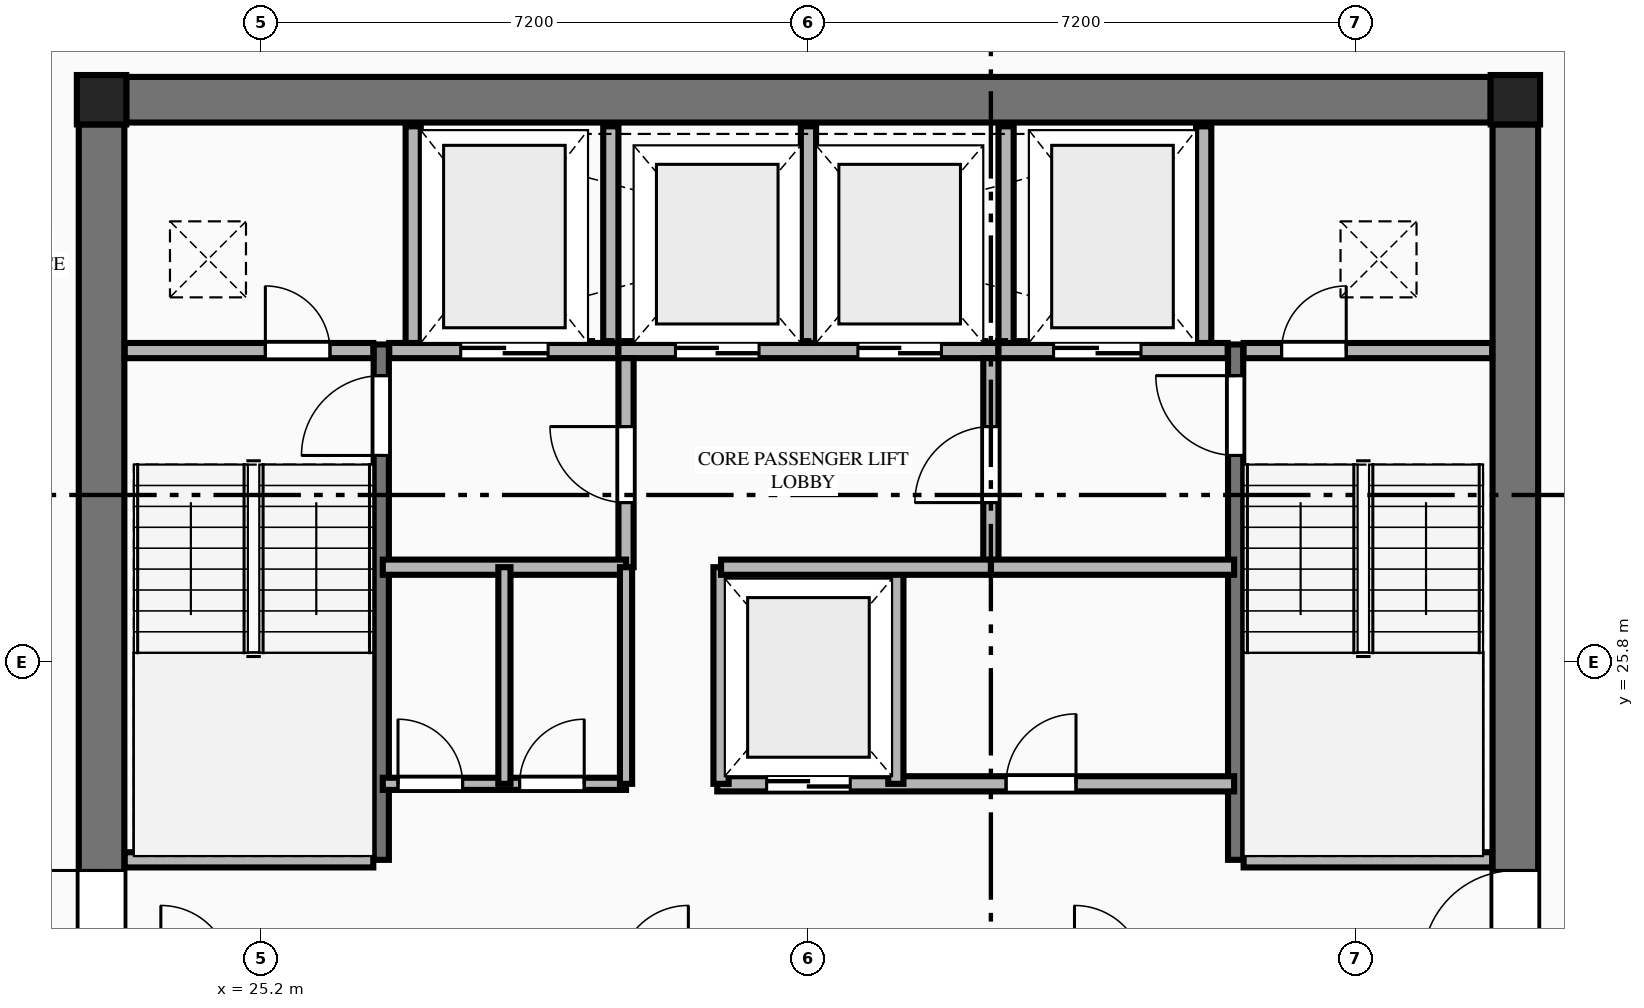
"""IFC4 building model, lengths in metres.
Left out: names, types, materials, properties, quantities, classifications, styles, units other than length and angle.
Written with IfcOpenShell. Run it as: python <this file> out.ifc"""

import sys

from ifc_helpers import new_model, si_unit, direction, frame, frame_2d, origin, origin_2d, place, context, subcontext, project, spatial, rectangle, extrude, element, fill, save


model = new_model("IFC4")
c1 = context("Model", 3, precision=1e-05, world=origin(), true_north=direction((0.0, 1.0)))
c2 = subcontext(c1, "Body", "Model", "MODEL_VIEW")
j1 = project(units=[si_unit("LENGTHUNIT", "METRE"), si_unit("PLANEANGLEUNIT", "RADIAN")], contexts=[c1])
p1 = place(None, origin())
s1 = spatial("IfcSite", under=j1, at=p1, CompositionType="ELEMENT")
p2 = place(p1, origin())
s2 = spatial("IfcBuilding", under=s1, at=p2, CompositionType="ELEMENT")
p3 = place(p2, frame((0.0, 0.0, 218.05)))
s3 = spatial("IfcBuildingStorey", under=s2, at=p3, CompositionType="ELEMENT", Elevation=218.05)
for number, where, z_axis, x_axis in (
    (1, (41.7, 33.2, 0.0), (0.0, 0.0, 1.0), (1.0, 0.0, 0.0)),
    (2, (23.1, 33.2, 0.0), (0.0, 0.0, 1.0), (1.0, 0.0, 0.0)),
):
    element("IfcColumn", number, at=place(p3, frame(where, z_axis=z_axis, x_axis=x_axis)), inside=s3, PredefinedType="COLUMN", context=c2, shape_type="SweptSolid", body=[
        extrude(rectangle(XDim=0.65, YDim=0.65, at=origin_2d()), origin(), (0.0, 0.0, 1.0), 3.55),
    ])
p4 = place(p3, frame((23.425, 33.2, 0.0), z_axis=(0.0, 0.0, 1.0), x_axis=(1.0, 0.0, 0.0)))
e3 = element("IfcWall", 3, at=p4, inside=s3, PredefinedType="SHEAR", context=c2, shape_type="SweptSolid", body=[
    extrude(rectangle(XDim=17.95, YDim=0.6, at=frame_2d((8.975, 0.0))), origin(), (0.0, 0.0, 1.0), 3.27),
])
p5 = place(p3, frame((23.1, 18.925, 0.0), z_axis=(0.0, 0.0, 1.0), x_axis=(0.0, 1.0, 0.0)))
e4 = element("IfcWall", 4, at=p5, inside=s3, PredefinedType="SHEAR", context=c2, shape_type="SweptSolid", body=[
    extrude(rectangle(XDim=13.95, YDim=0.6, at=frame_2d((6.975, 0.0))), origin(), (0.0, 0.0, 1.0), 3.27),
])
p6 = place(p5, frame((2.915, 0.0, 0.0)))
e5 = element("IfcOpeningElement", 5, at=p6, cuts=e4, PredefinedType="OPENING", context=c2, shape_type="SweptSolid", body=[
    extrude(rectangle(XDim=1.22, YDim=2.25, at=frame_2d((0.61, 1.125))), frame((0.0, 0.31, 0.0), z_axis=(0.0, -1.0, 0.0), x_axis=(1.0, 0.0, 0.0)), (0.0, 0.0, 1.0), 0.62),
])
p7 = place(p3, frame((41.7, 18.925, 0.0), z_axis=(0.0, 0.0, 1.0), x_axis=(0.0, 1.0, 0.0)))
e6 = element("IfcWall", 6, at=p7, inside=s3, PredefinedType="SHEAR", context=c2, shape_type="SweptSolid", body=[
    extrude(rectangle(XDim=13.95, YDim=0.6, at=frame_2d((6.975, 0.0))), origin(), (0.0, 0.0, 1.0), 3.27),
])
p8 = place(p7, frame((2.915, 0.0, 0.0)))
e7 = element("IfcOpeningElement", 7, at=p8, cuts=e6, PredefinedType="OPENING", context=c2, shape_type="SweptSolid", body=[
    extrude(rectangle(XDim=1.22, YDim=2.25, at=frame_2d((0.61, 1.125))), frame((0.0, 0.31, 0.0), z_axis=(0.0, -1.0, 0.0), x_axis=(1.0, 0.0, 0.0)), (0.0, 0.0, 1.0), 0.62),
])
p9 = place(p3, frame((26.78, 23.2, 0.0), z_axis=(0.0, 0.0, 1.0), x_axis=(0.0, 1.0, 0.0)))
e8 = element("IfcWall", 8, at=p9, inside=s3, PredefinedType="SHEAR", context=c2, shape_type="SweptSolid", body=[
    extrude(rectangle(XDim=6.78, YDim=0.2, at=frame_2d((3.39, 0.0))), origin(), (0.0, 0.0, 1.0), 3.55),
])
p10 = place(p9, frame((5.32, 0.0, 0.0)))
e9 = element("IfcOpeningElement", 9, at=p10, cuts=e8, PredefinedType="OPENING", context=c2, shape_type="SweptSolid", body=[
    extrude(rectangle(XDim=1.05, YDim=2.15, at=frame_2d((0.525, 1.075))), frame((0.0, 0.11, 0.0), z_axis=(0.0, -1.0, 0.0), x_axis=(1.0, 0.0, 0.0)), (0.0, 0.0, 1.0), 0.22),
])
p11 = place(p3, frame((23.405, 23.2, 0.0), z_axis=(0.0, 0.0, 1.0), x_axis=(1.0, 0.0, 0.0)))
e10 = element("IfcWall", 10, at=p11, inside=s3, PredefinedType="PLUMBINGWALL", context=c2, shape_type="SweptSolid", body=[
    extrude(rectangle(XDim=3.27, YDim=0.2, at=frame_2d((1.635, 0.0))), origin(), (0.0, 0.0, 1.0), 3.27),
])
p12 = place(p3, frame((38.02, 23.2, 0.0), z_axis=(0.0, 0.0, 1.0), x_axis=(0.0, 1.0, 0.0)))
e11 = element("IfcWall", 11, at=p12, inside=s3, PredefinedType="SHEAR", context=c2, shape_type="SweptSolid", body=[
    extrude(rectangle(XDim=6.78, YDim=0.2, at=frame_2d((3.39, 0.0))), origin(), (0.0, 0.0, 1.0), 3.55),
])
p13 = place(p12, frame((5.32, 0.0, 0.0)))
e12 = element("IfcOpeningElement", 12, at=p13, cuts=e11, PredefinedType="OPENING", context=c2, shape_type="SweptSolid", body=[
    extrude(rectangle(XDim=1.05, YDim=2.15, at=frame_2d((0.525, 1.075))), frame((0.0, 0.11, 0.0), z_axis=(0.0, -1.0, 0.0), x_axis=(1.0, 0.0, 0.0)), (0.0, 0.0, 1.0), 0.22),
])
p14 = place(p3, frame((38.125, 23.2, 0.0), z_axis=(0.0, 0.0, 1.0), x_axis=(1.0, 0.0, 0.0)))
e13 = element("IfcWall", 13, at=p14, inside=s3, PredefinedType="PLUMBINGWALL", context=c2, shape_type="SweptSolid", body=[
    extrude(rectangle(XDim=3.27, YDim=0.2, at=frame_2d((1.635, 0.0))), origin(), (0.0, 0.0, 1.0), 3.27),
])
p15 = place(p3, frame((23.405, 29.9, 0.0), z_axis=(0.0, 0.0, 1.0), x_axis=(1.0, 0.0, 0.0)))
e14 = element("IfcWall", 14, at=p15, inside=s3, PredefinedType="PLUMBINGWALL", context=c2, shape_type="SweptSolid", body=[
    extrude(rectangle(XDim=3.27, YDim=0.2, at=frame_2d((1.635, 0.0))), origin(), (0.0, 0.0, 1.0), 3.27),
])
p16 = place(p15, frame((1.85, 0.0, 0.0)))
e15 = element("IfcOpeningElement", 15, at=p16, cuts=e14, PredefinedType="OPENING", context=c2, shape_type="SweptSolid", body=[
    extrude(rectangle(XDim=0.85, YDim=2.05, at=frame_2d((0.425, 1.025))), frame((0.0, 0.11, 0.0), z_axis=(0.0, -1.0, 0.0), x_axis=(1.0, 0.0, 0.0)), (0.0, 0.0, 1.0), 0.22),
])
p17 = place(p3, frame((26.885, 29.9, 0.0), z_axis=(0.0, 0.0, 1.0), x_axis=(1.0, 0.0, 0.0)))
e16 = element("IfcWall", 16, at=p17, inside=s3, PredefinedType="PLUMBINGWALL", context=c2, shape_type="SweptSolid", body=[
    extrude(rectangle(XDim=3.015, YDim=0.2, at=frame_2d((1.507, 0.0))), origin(), (0.0, 0.0, 1.0), 3.27),
])
p18 = place(p17, frame((0.94, 0.0, 0.0)))
e17 = element("IfcOpeningElement", 17, at=p18, cuts=e16, PredefinedType="OPENING", context=c2, shape_type="SweptSolid", body=[
    extrude(rectangle(XDim=1.15, YDim=2.2, at=frame_2d((0.575, 1.1))), frame((0.0, 0.11, 0.0), z_axis=(0.0, -1.0, 0.0), x_axis=(1.0, 0.0, 0.0)), (0.0, 0.0, 1.0), 0.22),
])
p19 = place(p3, frame((29.9, 29.9, 0.0), z_axis=(0.0, 0.0, 1.0), x_axis=(1.0, 0.0, 0.0)))
e18 = element("IfcWall", 18, at=p19, inside=s3, PredefinedType="PLUMBINGWALL", context=c2, shape_type="SweptSolid", body=[
    extrude(rectangle(XDim=5.0, YDim=0.2, at=frame_2d((2.5, 0.0))), origin(), (0.0, 0.0, 1.0), 3.27),
])
p20 = place(p19, frame((0.75, 0.0, 0.0)))
e19 = element("IfcOpeningElement", 19, at=p20, cuts=e18, PredefinedType="OPENING", context=c2, shape_type="SweptSolid", body=[
    extrude(rectangle(XDim=1.1, YDim=2.2, at=frame_2d((0.55, 1.1))), frame((0.0, 0.11, 0.0), z_axis=(0.0, -1.0, 0.0), x_axis=(1.0, 0.0, 0.0)), (0.0, 0.0, 1.0), 0.22),
])
p21 = place(p19, frame((3.15, 0.0, 0.0)))
e20 = element("IfcOpeningElement", 20, at=p21, cuts=e18, PredefinedType="OPENING", context=c2, shape_type="SweptSolid", body=[
    extrude(rectangle(XDim=1.1, YDim=2.2, at=frame_2d((0.55, 1.1))), frame((0.0, 0.11, 0.0), z_axis=(0.0, -1.0, 0.0), x_axis=(1.0, 0.0, 0.0)), (0.0, 0.0, 1.0), 0.22),
])
p22 = place(p3, frame((34.9, 29.9, 0.0), z_axis=(0.0, 0.0, 1.0), x_axis=(1.0, 0.0, 0.0)))
e21 = element("IfcWall", 21, at=p22, inside=s3, PredefinedType="PLUMBINGWALL", context=c2, shape_type="SweptSolid", body=[
    extrude(rectangle(XDim=3.015, YDim=0.2, at=frame_2d((1.508, 0.0))), origin(), (0.0, 0.0, 1.0), 3.27),
])
p23 = place(p22, frame((0.725, 0.0, 0.0)))
e22 = element("IfcOpeningElement", 22, at=p23, cuts=e21, PredefinedType="OPENING", context=c2, shape_type="SweptSolid", body=[
    extrude(rectangle(XDim=1.15, YDim=2.2, at=frame_2d((0.575, 1.1))), frame((0.0, 0.11, 0.0), z_axis=(0.0, -1.0, 0.0), x_axis=(1.0, 0.0, 0.0)), (0.0, 0.0, 1.0), 0.22),
])
p24 = place(p3, frame((38.125, 29.9, 0.0), z_axis=(0.0, 0.0, 1.0), x_axis=(1.0, 0.0, 0.0)))
e23 = element("IfcWall", 23, at=p24, inside=s3, PredefinedType="PLUMBINGWALL", context=c2, shape_type="SweptSolid", body=[
    extrude(rectangle(XDim=3.27, YDim=0.2, at=frame_2d((1.635, 0.0))), origin(), (0.0, 0.0, 1.0), 3.27),
])
p25 = place(p24, frame((0.5, 0.0, 0.0)))
e24 = element("IfcOpeningElement", 24, at=p25, cuts=e23, PredefinedType="OPENING", context=c2, shape_type="SweptSolid", body=[
    extrude(rectangle(XDim=0.85, YDim=2.05, at=frame_2d((0.425, 1.025))), frame((0.0, 0.11, 0.0), z_axis=(0.0, -1.0, 0.0), x_axis=(1.0, 0.0, 0.0)), (0.0, 0.0, 1.0), 0.22),
])
for number, where, z_axis, x_axis in (
    (25, (27.2, 30.0, 0.0), (0.0, 0.0, 1.0), (0.0, 1.0, 0.0)),
    (26, (29.8, 30.0, 0.0), (0.0, 0.0, 1.0), (0.0, 1.0, 0.0)),
    (27, (32.4, 30.0, 0.0), (0.0, 0.0, 1.0), (0.0, 1.0, 0.0)),
    (28, (35.0, 30.0, 0.0), (0.0, 0.0, 1.0), (0.0, 1.0, 0.0)),
    (29, (37.6, 30.0, 0.0), (0.0, 0.0, 1.0), (0.0, 1.0, 0.0)),
):
    element("IfcWall", number, at=place(p3, frame(where, z_axis=z_axis, x_axis=x_axis)), inside=s3, PredefinedType="PLUMBINGWALL", context=c2, shape_type="SweptSolid", body=[
        extrude(rectangle(XDim=2.85, YDim=0.2, at=frame_2d((1.425, 0.0))), origin(), (0.0, 0.0, 1.0), 3.27),
    ])
p26 = place(p3, frame((30.0, 27.05, 0.0), z_axis=(0.0, 0.0, 1.0), x_axis=(0.0, 1.0, 0.0)))
e30 = element("IfcWall", 30, at=p26, inside=s3, PredefinedType="PLUMBINGWALL", context=c2, shape_type="SweptSolid", body=[
    extrude(rectangle(XDim=2.75, YDim=0.2, at=frame_2d((1.375, 0.0))), origin(), (0.0, 0.0, 1.0), 3.27),
])
p27 = place(p26, frame((0.85, 0.0, 0.0)))
e31 = element("IfcOpeningElement", 31, at=p27, cuts=e30, PredefinedType="OPENING", context=c2, shape_type="SweptSolid", body=[
    extrude(rectangle(XDim=1.0, YDim=2.15, at=frame_2d((0.5, 1.075))), frame((0.0, 0.11, 0.0), z_axis=(0.0, -1.0, 0.0), x_axis=(1.0, 0.0, 0.0)), (0.0, 0.0, 1.0), 0.22),
])
p28 = place(p3, frame((26.8, 27.05, 0.0), z_axis=(0.0, 0.0, 1.0), x_axis=(1.0, 0.0, 0.0)))
e32 = element("IfcWall", 32, at=p28, inside=s3, PredefinedType="PLUMBINGWALL", context=c2, shape_type="SweptSolid", body=[
    extrude(rectangle(XDim=3.2, YDim=0.2, at=frame_2d((1.6, 0.0))), origin(), (0.0, 0.0, 1.0), 3.27),
])
p29 = place(p3, frame((34.8, 27.05, 0.0), z_axis=(0.0, 0.0, 1.0), x_axis=(0.0, 1.0, 0.0)))
e33 = element("IfcWall", 33, at=p29, inside=s3, PredefinedType="PLUMBINGWALL", context=c2, shape_type="SweptSolid", body=[
    extrude(rectangle(XDim=2.75, YDim=0.2, at=frame_2d((1.375, 0.0))), origin(), (0.0, 0.0, 1.0), 3.27),
])
p30 = place(p29, frame((0.85, 0.0, 0.0)))
e34 = element("IfcOpeningElement", 34, at=p30, cuts=e33, PredefinedType="OPENING", context=c2, shape_type="SweptSolid", body=[
    extrude(rectangle(XDim=1.0, YDim=2.15, at=frame_2d((0.5, 1.075))), frame((0.0, 0.11, 0.0), z_axis=(0.0, -1.0, 0.0), x_axis=(1.0, 0.0, 0.0)), (0.0, 0.0, 1.0), 0.22),
])
p31 = place(p3, frame((34.8, 27.05, 0.0), z_axis=(0.0, 0.0, 1.0), x_axis=(1.0, 0.0, 0.0)))
e35 = element("IfcWall", 35, at=p31, inside=s3, PredefinedType="PLUMBINGWALL", context=c2, shape_type="SweptSolid", body=[
    extrude(rectangle(XDim=3.2, YDim=0.2, at=frame_2d((1.6, 0.0))), origin(), (0.0, 0.0, 1.0), 3.27),
])
p32 = place(p3, frame((26.8, 24.2, 0.0), z_axis=(0.0, 0.0, 1.0), x_axis=(1.0, 0.0, 0.0)))
e36 = element("IfcWall", 36, at=p32, inside=s3, PredefinedType="PARTITIONING", context=c2, shape_type="SweptSolid", body=[
    extrude(rectangle(XDim=3.2, YDim=0.16, at=frame_2d((1.6, 0.0))), origin(), (0.0, 0.0, 1.0), 3.27),
])
p33 = place(p32, frame((0.2, 0.0, 0.0)))
e37 = element("IfcOpeningElement", 37, at=p33, cuts=e36, PredefinedType="OPENING", context=c2, shape_type="SweptSolid", body=[
    extrude(rectangle(XDim=0.85, YDim=2.05, at=frame_2d((0.425, 1.025))), frame((0.0, 0.09, 0.0), z_axis=(0.0, -1.0, 0.0), x_axis=(1.0, 0.0, 0.0)), (0.0, 0.0, 1.0), 0.18),
])
p34 = place(p32, frame((1.8, 0.0, 0.0)))
e38 = element("IfcOpeningElement", 38, at=p34, cuts=e36, PredefinedType="OPENING", context=c2, shape_type="SweptSolid", body=[
    extrude(rectangle(XDim=0.85, YDim=2.05, at=frame_2d((0.425, 1.025))), frame((0.0, 0.09, 0.0), z_axis=(0.0, -1.0, 0.0), x_axis=(1.0, 0.0, 0.0)), (0.0, 0.0, 1.0), 0.18),
])
p35 = place(p3, frame((30.0, 24.2, 0.0), z_axis=(0.0, 0.0, 1.0), x_axis=(0.0, 1.0, 0.0)))
e39 = element("IfcWall", 39, at=p35, inside=s3, PredefinedType="PARTITIONING", context=c2, shape_type="SweptSolid", body=[
    extrude(rectangle(XDim=2.85, YDim=0.16, at=frame_2d((1.425, 0.0))), origin(), (0.0, 0.0, 1.0), 3.27),
])
p36 = place(p3, frame((31.2, 24.2, 0.0), z_axis=(0.0, 0.0, 1.0), x_axis=(1.0, 0.0, 0.0)))
e40 = element("IfcWall", 40, at=p36, inside=s3, PredefinedType="PLUMBINGWALL", context=c2, shape_type="SweptSolid", body=[
    extrude(rectangle(XDim=6.8, YDim=0.2, at=frame_2d((3.4, 0.0))), origin(), (0.0, 0.0, 1.0), 3.27),
])
p37 = place(p36, frame((0.65, 0.0, 0.0)))
e41 = element("IfcOpeningElement", 41, at=p37, cuts=e40, PredefinedType="OPENING", context=c2, shape_type="SweptSolid", body=[
    extrude(rectangle(XDim=1.1, YDim=2.2, at=frame_2d((0.55, 1.1))), frame((0.0, 0.11, 0.0), z_axis=(0.0, -1.0, 0.0), x_axis=(1.0, 0.0, 0.0)), (0.0, 0.0, 1.0), 0.22),
])
p38 = place(p36, frame((3.8, 0.0, 0.0)))
e42 = element("IfcOpeningElement", 42, at=p38, cuts=e40, PredefinedType="OPENING", context=c2, shape_type="SweptSolid", body=[
    extrude(rectangle(XDim=0.92, YDim=2.15, at=frame_2d((0.46, 1.075))), frame((0.0, 0.11, 0.0), z_axis=(0.0, -1.0, 0.0), x_axis=(1.0, 0.0, 0.0)), (0.0, 0.0, 1.0), 0.22),
])
for number, where, z_axis, x_axis in (
    (43, (31.25, 24.2, 0.0), (0.0, 0.0, 1.0), (0.0, 1.0, 0.0)),
    (44, (33.55, 24.2, 0.0), (0.0, 0.0, 1.0), (0.0, 1.0, 0.0)),
):
    element("IfcWall", number, at=place(p3, frame(where, z_axis=z_axis, x_axis=x_axis)), inside=s3, PredefinedType="PLUMBINGWALL", context=c2, shape_type="SweptSolid", body=[
        extrude(rectangle(XDim=2.85, YDim=0.2, at=frame_2d((1.425, 0.0))), origin(), (0.0, 0.0, 1.0), 3.27),
    ])
p39 = place(p3, frame((31.25, 27.05, 0.0), z_axis=(0.0, 0.0, 1.0), x_axis=(1.0, 0.0, 0.0)))
e45 = element("IfcWall", 45, at=p39, inside=s3, PredefinedType="PLUMBINGWALL", context=c2, shape_type="SweptSolid", body=[
    extrude(rectangle(XDim=3.55, YDim=0.2, at=frame_2d((1.775, 0.0))), origin(), (0.0, 0.0, 1.0), 3.27),
])
p40 = place(p3, frame((28.4, 24.2, 0.0), z_axis=(0.0, 0.0, 1.0), x_axis=(0.0, 1.0, 0.0)))
e46 = element("IfcWall", 46, at=p40, inside=s3, PredefinedType="PARTITIONING", context=c2, shape_type="SweptSolid", body=[
    extrude(rectangle(XDim=2.85, YDim=0.16, at=frame_2d((1.425, 0.0))), origin(), (0.0, 0.0, 1.0), 3.27),
])
p41 = place(p6, origin())
e47 = element("IfcDoor", 47, at=p41, inside=s3, OperationType="SINGLE_SWING_RIGHT", PredefinedType="DOOR", context=c2, shape_type="SweptSolid", body=[
    extrude(rectangle(XDim=1.22, YDim=2.25, at=frame_2d((0.61, 1.125))), frame((0.0, 0.025, 0.0), z_axis=(0.0, -1.0, 0.0), x_axis=(1.0, 0.0, 0.0)), (0.0, 0.0, 1.0), 0.05),
])
fill(e5, e47)
p42 = place(p8, origin())
e48 = element("IfcDoor", 48, at=p42, inside=s3, OperationType="SINGLE_SWING_LEFT", PredefinedType="DOOR", context=c2, shape_type="SweptSolid", body=[
    extrude(rectangle(XDim=1.22, YDim=2.25, at=frame_2d((0.61, 1.125))), frame((0.0, 0.025, 0.0), z_axis=(0.0, -1.0, 0.0), x_axis=(1.0, 0.0, 0.0)), (0.0, 0.0, 1.0), 0.05),
])
fill(e7, e48)
p43 = place(p10, origin())
e49 = element("IfcDoor", 49, at=p43, inside=s3, OperationType="SINGLE_SWING_LEFT", PredefinedType="DOOR", context=c2, shape_type="SweptSolid", body=[
    extrude(rectangle(XDim=1.05, YDim=2.15, at=frame_2d((0.525, 1.075))), frame((0.0, 0.025, 0.0), z_axis=(0.0, -1.0, 0.0), x_axis=(1.0, 0.0, 0.0)), (0.0, 0.0, 1.0), 0.05),
])
fill(e9, e49)
p44 = place(p13, origin())
e50 = element("IfcDoor", 50, at=p44, inside=s3, OperationType="SINGLE_SWING_RIGHT", PredefinedType="DOOR", context=c2, shape_type="SweptSolid", body=[
    extrude(rectangle(XDim=1.05, YDim=2.15, at=frame_2d((0.525, 1.075))), frame((0.0, 0.025, 0.0), z_axis=(0.0, -1.0, 0.0), x_axis=(1.0, 0.0, 0.0)), (0.0, 0.0, 1.0), 0.05),
])
fill(e12, e50)
p45 = place(p16, origin())
e51 = element("IfcDoor", 51, at=p45, inside=s3, OperationType="SINGLE_SWING_LEFT", PredefinedType="DOOR", context=c2, shape_type="SweptSolid", body=[
    extrude(rectangle(XDim=0.85, YDim=2.05, at=frame_2d((0.425, 1.025))), frame((0.0, 0.025, 0.0), z_axis=(0.0, -1.0, 0.0), x_axis=(1.0, 0.0, 0.0)), (0.0, 0.0, 1.0), 0.05),
])
fill(e15, e51)
p46 = place(p25, origin())
e52 = element("IfcDoor", 52, at=p46, inside=s3, OperationType="SINGLE_SWING_RIGHT", PredefinedType="DOOR", context=c2, shape_type="SweptSolid", body=[
    extrude(rectangle(XDim=0.85, YDim=2.05, at=frame_2d((0.425, 1.025))), frame((0.0, 0.025, 0.0), z_axis=(0.0, -1.0, 0.0), x_axis=(1.0, 0.0, 0.0)), (0.0, 0.0, 1.0), 0.05),
])
fill(e24, e52)
p47 = place(p18, origin())
e53 = element("IfcDoor", 53, at=p47, inside=s3, OperationType="DOUBLE_DOOR_SLIDING", PredefinedType="DOOR", context=c2, shape_type="SweptSolid", body=[
    extrude(rectangle(XDim=1.15, YDim=2.2, at=frame_2d((0.575, 1.1))), frame((0.0, 0.025, 0.0), z_axis=(0.0, -1.0, 0.0), x_axis=(1.0, 0.0, 0.0)), (0.0, 0.0, 1.0), 0.05),
])
fill(e17, e53)
p48 = place(p23, origin())
e54 = element("IfcDoor", 54, at=p48, inside=s3, OperationType="DOUBLE_DOOR_SLIDING", PredefinedType="DOOR", context=c2, shape_type="SweptSolid", body=[
    extrude(rectangle(XDim=1.15, YDim=2.2, at=frame_2d((0.575, 1.1))), frame((0.0, 0.025, 0.0), z_axis=(0.0, -1.0, 0.0), x_axis=(1.0, 0.0, 0.0)), (0.0, 0.0, 1.0), 0.05),
])
fill(e22, e54)
p49 = place(p20, origin())
e55 = element("IfcDoor", 55, at=p49, inside=s3, OperationType="DOUBLE_DOOR_SLIDING", PredefinedType="DOOR", context=c2, shape_type="SweptSolid", body=[
    extrude(rectangle(XDim=1.1, YDim=2.2, at=frame_2d((0.55, 1.1))), frame((0.0, 0.025, 0.0), z_axis=(0.0, -1.0, 0.0), x_axis=(1.0, 0.0, 0.0)), (0.0, 0.0, 1.0), 0.05),
])
fill(e19, e55)
p50 = place(p21, origin())
e56 = element("IfcDoor", 56, at=p50, inside=s3, OperationType="DOUBLE_DOOR_SLIDING", PredefinedType="DOOR", context=c2, shape_type="SweptSolid", body=[
    extrude(rectangle(XDim=1.1, YDim=2.2, at=frame_2d((0.55, 1.1))), frame((0.0, 0.025, 0.0), z_axis=(0.0, -1.0, 0.0), x_axis=(1.0, 0.0, 0.0)), (0.0, 0.0, 1.0), 0.05),
])
fill(e20, e56)
p51 = place(p27, origin())
e57 = element("IfcDoor", 57, at=p51, inside=s3, OperationType="SINGLE_SWING_RIGHT", PredefinedType="DOOR", context=c2, shape_type="SweptSolid", body=[
    extrude(rectangle(XDim=1.0, YDim=2.15, at=frame_2d((0.5, 1.075))), frame((0.0, 0.025, 0.0), z_axis=(0.0, -1.0, 0.0), x_axis=(1.0, 0.0, 0.0)), (0.0, 0.0, 1.0), 0.05),
])
fill(e31, e57)
p52 = place(p30, origin())
e58 = element("IfcDoor", 58, at=p52, inside=s3, OperationType="SINGLE_SWING_LEFT", PredefinedType="DOOR", context=c2, shape_type="SweptSolid", body=[
    extrude(rectangle(XDim=1.0, YDim=2.15, at=frame_2d((0.5, 1.075))), frame((0.0, 0.025, 0.0), z_axis=(0.0, -1.0, 0.0), x_axis=(1.0, 0.0, 0.0)), (0.0, 0.0, 1.0), 0.05),
])
fill(e34, e58)
p53 = place(p37, origin())
e59 = element("IfcDoor", 59, at=p53, inside=s3, OperationType="DOUBLE_DOOR_SLIDING", PredefinedType="DOOR", context=c2, shape_type="SweptSolid", body=[
    extrude(rectangle(XDim=1.1, YDim=2.2, at=frame_2d((0.55, 1.1))), frame((0.0, 0.025, 0.0), z_axis=(0.0, -1.0, 0.0), x_axis=(1.0, 0.0, 0.0)), (0.0, 0.0, 1.0), 0.05),
])
fill(e41, e59)
p54 = place(p33, origin())
e60 = element("IfcDoor", 60, at=p54, inside=s3, OperationType="SINGLE_SWING_LEFT", PredefinedType="DOOR", context=c2, shape_type="SweptSolid", body=[
    extrude(rectangle(XDim=0.85, YDim=2.05, at=frame_2d((0.425, 1.025))), frame((0.0, 0.025, 0.0), z_axis=(0.0, -1.0, 0.0), x_axis=(1.0, 0.0, 0.0)), (0.0, 0.0, 1.0), 0.05),
])
fill(e37, e60)
p55 = place(p34, origin())
e61 = element("IfcDoor", 61, at=p55, inside=s3, OperationType="SINGLE_SWING_RIGHT", PredefinedType="DOOR", context=c2, shape_type="SweptSolid", body=[
    extrude(rectangle(XDim=0.85, YDim=2.05, at=frame_2d((0.425, 1.025))), frame((0.0, 0.025, 0.0), z_axis=(0.0, -1.0, 0.0), x_axis=(1.0, 0.0, 0.0)), (0.0, 0.0, 1.0), 0.05),
])
fill(e38, e61)
p56 = place(p38, origin())
e62 = element("IfcDoor", 62, at=p56, inside=s3, OperationType="SINGLE_SWING_RIGHT", PredefinedType="DOOR", context=c2, shape_type="SweptSolid", body=[
    extrude(rectangle(XDim=0.92, YDim=2.15, at=frame_2d((0.46, 1.075))), frame((0.0, 0.025, 0.0), z_axis=(0.0, -1.0, 0.0), x_axis=(1.0, 0.0, 0.0)), (0.0, 0.0, 1.0), 0.05),
])
fill(e42, e62)
save(model, sys.argv[1])
